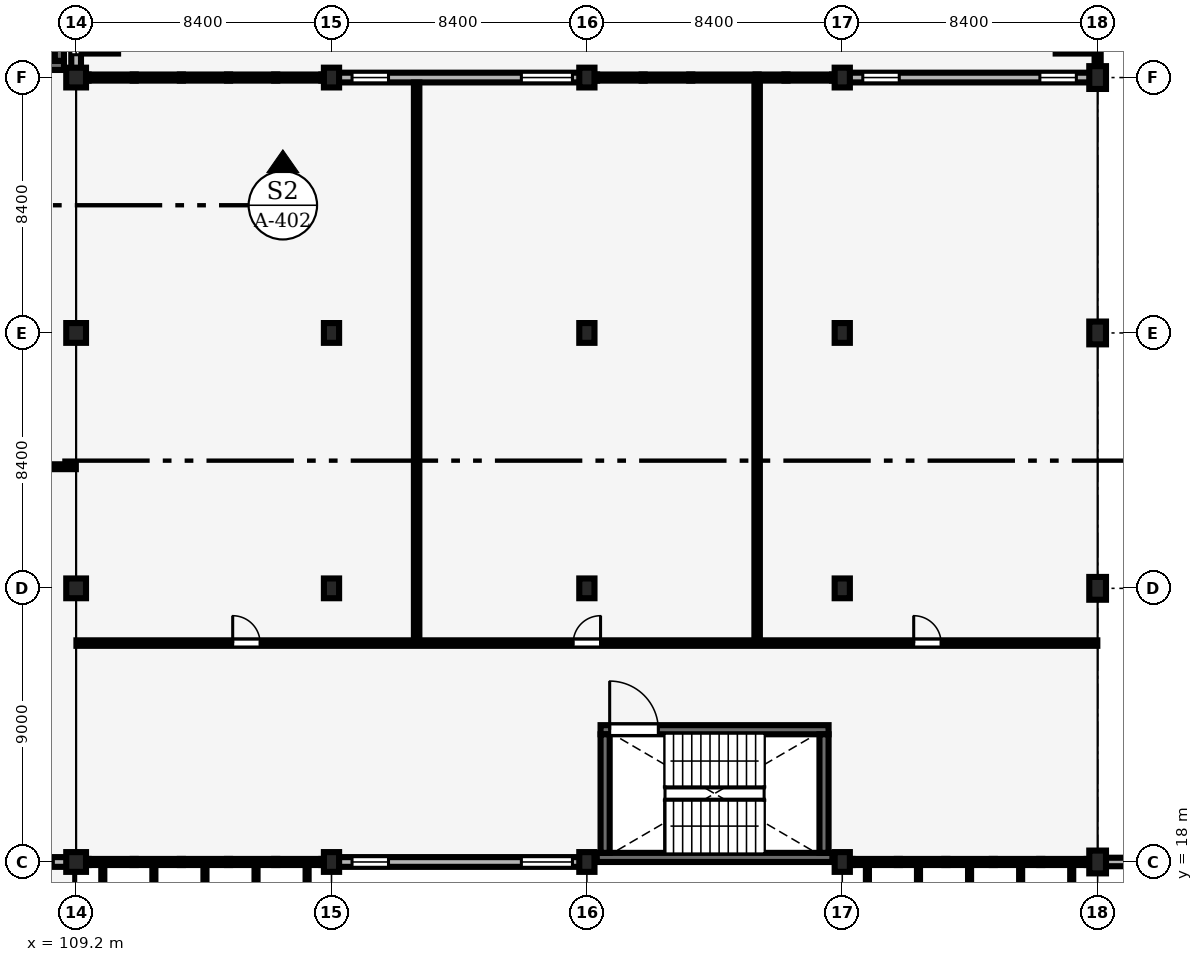
"""IFC4 building model, lengths in metres.
Left out: names, types, materials, properties, quantities, classifications, styles, units other than length and angle.
Written with IfcOpenShell. Run it as: python <this file> out.ifc"""

import sys

from ifc_helpers import new_model, si_unit, direction, frame, frame_2d, origin, origin_2d, place, context, subcontext, project, spatial, rectangle, extrude, element, fill, save


model = new_model("IFC4")
c1 = context("Model", 3, precision=1e-05, world=origin(), true_north=direction((0.0, 1.0)))
c2 = subcontext(c1, "Body", "Model", "MODEL_VIEW")
j1 = project(units=[si_unit("LENGTHUNIT", "METRE"), si_unit("PLANEANGLEUNIT", "RADIAN")], contexts=[c1])
p1 = place(None, origin())
s1 = spatial("IfcSite", under=j1, at=p1, CompositionType="ELEMENT")
p2 = place(p1, origin())
s2 = spatial("IfcBuilding", under=s1, at=p2, CompositionType="ELEMENT")
p3 = place(p2, frame((0.0, 0.0, 4.8)))
s3 = spatial("IfcBuildingStorey", under=s2, at=p3, CompositionType="ELEMENT", Elevation=4.8)
for number, where, z_axis, x_axis in (
    (1, (109.2, 18.0, 0.0), (0.0, 0.0, 1.0), (1.0, 0.0, 0.0)),
    (2, (109.2, 27.0, 0.0), (0.0, 0.0, 1.0), (1.0, 0.0, 0.0)),
    (3, (109.2, 35.4, 0.0), (0.0, 0.0, 1.0), (1.0, 0.0, 0.0)),
    (4, (109.2, 43.8, 0.0), (0.0, 0.0, 1.0), (1.0, 0.0, 0.0)),
):
    element("IfcColumn", number, at=place(p3, frame(where, z_axis=z_axis, x_axis=x_axis)), inside=s3, PredefinedType="COLUMN", context=c2, shape_type="SweptSolid", body=[
        extrude(rectangle(XDim=0.65, YDim=0.65, at=origin_2d()), origin(), (0.0, 0.0, 1.0), 4.2),
    ])
for number, where, z_axis, x_axis in (
    (5, (117.6, 18.0, 0.0), (0.0, 0.0, 1.0), (1.0, 0.0, 0.0)),
    (6, (117.6, 27.0, 0.0), (0.0, 0.0, 1.0), (1.0, 0.0, 0.0)),
    (7, (117.6, 35.4, 0.0), (0.0, 0.0, 1.0), (1.0, 0.0, 0.0)),
    (8, (117.6, 43.8, 0.0), (0.0, 0.0, 1.0), (1.0, 0.0, 0.0)),
    (9, (126.0, 18.0, 0.0), (0.0, 0.0, 1.0), (1.0, 0.0, 0.0)),
    (10, (126.0, 27.0, 0.0), (0.0, 0.0, 1.0), (1.0, 0.0, 0.0)),
    (11, (126.0, 35.4, 0.0), (0.0, 0.0, 1.0), (1.0, 0.0, 0.0)),
    (12, (126.0, 43.8, 0.0), (0.0, 0.0, 1.0), (1.0, 0.0, 0.0)),
    (13, (134.4, 18.0, 0.0), (0.0, 0.0, 1.0), (1.0, 0.0, 0.0)),
    (14, (134.4, 27.0, 0.0), (0.0, 0.0, 1.0), (1.0, 0.0, 0.0)),
    (15, (134.4, 35.4, 0.0), (0.0, 0.0, 1.0), (1.0, 0.0, 0.0)),
    (16, (134.4, 43.8, 0.0), (0.0, 0.0, 1.0), (1.0, 0.0, 0.0)),
):
    element("IfcColumn", number, at=place(p3, frame(where, z_axis=z_axis, x_axis=x_axis)), inside=s3, PredefinedType="COLUMN", context=c2, shape_type="SweptSolid", body=[
        extrude(rectangle(XDim=0.5, YDim=0.65, at=origin_2d()), origin(), (0.0, 0.0, 1.0), 4.2),
    ])
for number, where, z_axis, x_axis in (
    (17, (142.8, 18.0, 0.0), (0.0, 0.0, 1.0), (1.0, 0.0, 0.0)),
    (18, (142.8, 27.0, 0.0), (0.0, 0.0, 1.0), (1.0, 0.0, 0.0)),
    (19, (142.8, 35.4, 0.0), (0.0, 0.0, 1.0), (1.0, 0.0, 0.0)),
    (20, (142.8, 43.8, 0.0), (0.0, 0.0, 1.0), (1.0, 0.0, 0.0)),
):
    element("IfcColumn", number, at=place(p3, frame(where, z_axis=z_axis, x_axis=x_axis)), inside=s3, PredefinedType="COLUMN", context=c2, shape_type="SweptSolid", body=[
        extrude(rectangle(XDim=0.55, YDim=0.75, at=origin_2d()), origin(), (0.0, 0.0, 1.0), 4.2),
    ])
p4 = place(p3, frame((101.1, 18.0, 0.0), z_axis=(0.0, 0.0, 1.0), x_axis=(1.0, 0.0, 0.0)))
e21 = element("IfcWall", 21, at=p4, inside=s3, PredefinedType="SOLIDWALL", context=c2, shape_type="SweptSolid", body=[
    extrude(rectangle(XDim=7.8, YDim=0.32, at=frame_2d((3.9, 0.0))), origin(), (0.0, 0.0, 1.0), 3.1),
])
p5 = place(p4, frame((0.45, 0.0, 0.9)))
e22 = element("IfcOpeningElement", 22, at=p5, cuts=e21, PredefinedType="OPENING", context=c2, shape_type="SweptSolid", body=[
    extrude(rectangle(XDim=1.68, YDim=2.05, at=frame_2d((0.84, 1.025))), frame((0.0, 0.17, 0.0), z_axis=(0.0, -1.0, 0.0), x_axis=(1.0, 0.0, 0.0)), (0.0, 0.0, 1.0), 0.34),
])
p6 = place(p4, frame((6.15, 0.0, 0.9)))
e23 = element("IfcOpeningElement", 23, at=p6, cuts=e21, PredefinedType="OPENING", context=c2, shape_type="SweptSolid", body=[
    extrude(rectangle(XDim=1.2, YDim=1.5, at=frame_2d((0.6, 0.75))), frame((0.0, 0.17, 0.0), z_axis=(0.0, -1.0, 0.0), x_axis=(1.0, 0.0, 0.0)), (0.0, 0.0, 1.0), 0.34),
])
p7 = place(p3, frame((117.825, 18.0, 0.0), z_axis=(0.0, 0.0, 1.0), x_axis=(1.0, 0.0, 0.0)))
e24 = element("IfcWall", 24, at=p7, inside=s3, PredefinedType="SOLIDWALL", context=c2, shape_type="SweptSolid", body=[
    extrude(rectangle(XDim=7.95, YDim=0.32, at=frame_2d((3.975, 0.0))), origin(), (0.0, 0.0, 1.0), 3.14),
])
p8 = place(p7, frame((0.45, 0.0, 0.9)))
e25 = element("IfcOpeningElement", 25, at=p8, cuts=e24, PredefinedType="OPENING", context=c2, shape_type="SweptSolid", body=[
    extrude(rectangle(XDim=1.2, YDim=1.8, at=frame_2d((0.6, 0.9))), frame((0.0, 0.17, 0.0), z_axis=(0.0, -1.0, 0.0), x_axis=(1.0, 0.0, 0.0)), (0.0, 0.0, 1.0), 0.34),
])
p9 = place(p7, frame((6.02, 0.0, 0.9)))
e26 = element("IfcOpeningElement", 26, at=p9, cuts=e24, PredefinedType="OPENING", context=c2, shape_type="SweptSolid", body=[
    extrude(rectangle(XDim=1.68, YDim=2.09, at=frame_2d((0.84, 1.045))), frame((0.0, 0.17, 0.0), z_axis=(0.0, -1.0, 0.0), x_axis=(1.0, 0.0, 0.0)), (0.0, 0.0, 1.0), 0.34),
])
p10 = place(p3, frame((143.05, 18.0, 0.0), z_axis=(0.0, 0.0, 1.0), x_axis=(1.0, 0.0, 0.0)))
e27 = element("IfcWall", 27, at=p10, inside=s3, PredefinedType="SOLIDWALL", context=c2, shape_type="SweptSolid", body=[
    extrude(rectangle(XDim=7.9, YDim=0.28, at=frame_2d((3.95, 0.0))), origin(), (0.0, 0.0, 1.0), 3.667),
])
p11 = place(p10, frame((2.45, 0.0, 1.25)))
e28 = element("IfcOpeningElement", 28, at=p11, cuts=e27, PredefinedType="OPENING", context=c2, shape_type="SweptSolid", body=[
    extrude(rectangle(XDim=2.6, YDim=1.4, at=frame_2d((1.3, 0.7))), frame((0.0, 0.15, 0.0), z_axis=(0.0, -1.0, 0.0), x_axis=(1.0, 0.0, 0.0)), (0.0, 0.0, 1.0), 0.3),
])
p12 = place(p3, frame((117.825, 43.8, 0.0), z_axis=(0.0, 0.0, 1.0), x_axis=(1.0, 0.0, 0.0)))
e29 = element("IfcWall", 29, at=p12, inside=s3, PredefinedType="SOLIDWALL", context=c2, shape_type="SweptSolid", body=[
    extrude(rectangle(XDim=7.95, YDim=0.32, at=frame_2d((3.975, 0.0))), origin(), (0.0, 0.0, 1.0), 3.08),
])
p13 = place(p12, frame((0.45, 0.0, 0.9)))
e30 = element("IfcOpeningElement", 30, at=p13, cuts=e29, PredefinedType="OPENING", context=c2, shape_type="SweptSolid", body=[
    extrude(rectangle(XDim=1.2, YDim=1.8, at=frame_2d((0.6, 0.9))), frame((0.0, 0.17, 0.0), z_axis=(0.0, -1.0, 0.0), x_axis=(1.0, 0.0, 0.0)), (0.0, 0.0, 1.0), 0.34),
])
p14 = place(p12, frame((6.02, 0.0, 0.9)))
e31 = element("IfcOpeningElement", 31, at=p14, cuts=e29, PredefinedType="OPENING", context=c2, shape_type="SweptSolid", body=[
    extrude(rectangle(XDim=1.68, YDim=2.03, at=frame_2d((0.84, 1.015))), frame((0.0, 0.17, 0.0), z_axis=(0.0, -1.0, 0.0), x_axis=(1.0, 0.0, 0.0)), (0.0, 0.0, 1.0), 0.34),
])
p15 = place(p3, frame((134.625, 43.8, 0.0), z_axis=(0.0, 0.0, 1.0), x_axis=(1.0, 0.0, 0.0)))
e32 = element("IfcWall", 32, at=p15, inside=s3, PredefinedType="SOLIDWALL", context=c2, shape_type="SweptSolid", body=[
    extrude(rectangle(XDim=7.925, YDim=0.32, at=frame_2d((3.962, 0.0))), origin(), (0.0, 0.0, 1.0), 3.43),
])
p16 = place(p15, frame((0.45, 0.0, 0.9)))
e33 = element("IfcOpeningElement", 33, at=p16, cuts=e32, PredefinedType="OPENING", context=c2, shape_type="SweptSolid", body=[
    extrude(rectangle(XDim=1.2, YDim=1.5, at=frame_2d((0.6, 0.75))), frame((0.0, 0.17, 0.0), z_axis=(0.0, -1.0, 0.0), x_axis=(1.0, 0.0, 0.0)), (0.0, 0.0, 1.0), 0.34),
])
p17 = place(p15, frame((6.275, 0.0, 0.9)))
e34 = element("IfcOpeningElement", 34, at=p17, cuts=e32, PredefinedType="OPENING", context=c2, shape_type="SweptSolid", body=[
    extrude(rectangle(XDim=1.2, YDim=1.8, at=frame_2d((0.6, 0.9))), frame((0.0, 0.17, 0.0), z_axis=(0.0, -1.0, 0.0), x_axis=(1.0, 0.0, 0.0)), (0.0, 0.0, 1.0), 0.34),
])
p18 = place(p3, frame((109.2, 44.1, 0.0), z_axis=(0.0, 0.0, 1.0), x_axis=(0.0, 1.0, 0.0)))
e35 = element("IfcWall", 35, at=p18, inside=s3, PredefinedType="SOLIDWALL", context=c2, shape_type="SweptSolid", body=[
    extrude(rectangle(XDim=7.8, YDim=0.32, at=frame_2d((3.9, 0.0))), origin(), (0.0, 0.0, 1.0), 3.3),
])
p19 = place(p18, frame((0.45, 0.0, 0.85)))
e36 = element("IfcOpeningElement", 36, at=p19, cuts=e35, PredefinedType="OPENING", context=c2, shape_type="SweptSolid", body=[
    extrude(rectangle(XDim=1.2, YDim=1.8, at=frame_2d((0.6, 0.9))), frame((0.0, 0.17, 0.0), z_axis=(0.0, -1.0, 0.0), x_axis=(1.0, 0.0, 0.0)), (0.0, 0.0, 1.0), 0.34),
])
p20 = place(p18, frame((6.15, 0.0, 0.85)))
e37 = element("IfcOpeningElement", 37, at=p20, cuts=e35, PredefinedType="OPENING", context=c2, shape_type="SweptSolid", body=[
    extrude(rectangle(XDim=1.2, YDim=1.8, at=frame_2d((0.6, 0.9))), frame((0.0, 0.17, 0.0), z_axis=(0.0, -1.0, 0.0), x_axis=(1.0, 0.0, 0.0)), (0.0, 0.0, 1.0), 0.34),
])
p21 = place(p3, frame((101.2, 44.2, 0.0), z_axis=(0.0, 0.0, 1.0), x_axis=(1.0, 0.0, 0.0)))
e38 = element("IfcWall", 38, at=p21, inside=s3, PredefinedType="SHEAR", context=c2, shape_type="SweptSolid", body=[
    extrude(rectangle(XDim=7.6, YDim=0.3, at=frame_2d((3.8, 0.0))), origin(), (0.0, 0.0, 1.0), 4.025),
])
p22 = place(p3, frame((108.65, 44.35, 0.0), z_axis=(0.0, 0.0, 1.0), x_axis=(0.0, 1.0, 0.0)))
e39 = element("IfcWall", 39, at=p22, inside=s3, PredefinedType="SHEAR", context=c2, shape_type="SweptSolid", body=[
    extrude(rectangle(XDim=3.8, YDim=0.3, at=frame_2d((1.9, 0.0))), origin(), (0.0, 0.0, 1.0), 4.025),
])
p23 = place(p3, frame((126.325, 18.15, 0.0), z_axis=(0.0, 0.0, 1.0), x_axis=(1.0, 0.0, 0.0)))
e40 = element("IfcWall", 40, at=p23, inside=s3, PredefinedType="SHEAR", context=c2, shape_type="SweptSolid", body=[
    extrude(rectangle(XDim=7.75, YDim=0.3, at=frame_2d((3.875, 0.0))), origin(), (0.0, 0.0, 1.0), 4.025),
])
p24 = place(p3, frame((126.45, 22.35, 0.0), z_axis=(0.0, 0.0, 1.0), x_axis=(1.0, 0.0, 0.0)))
e41 = element("IfcWall", 41, at=p24, inside=s3, PredefinedType="SHEAR", context=c2, shape_type="SweptSolid", body=[
    extrude(rectangle(XDim=7.5, YDim=0.3, at=frame_2d((3.75, 0.0))), origin(), (0.0, 0.0, 1.0), 4.025),
])
p25 = place(p24, frame((0.3, 0.0, 0.0)))
e42 = element("IfcOpeningElement", 42, at=p25, cuts=e41, PredefinedType="OPENING", context=c2, shape_type="SweptSolid", body=[
    extrude(rectangle(XDim=1.6, YDim=2.2, at=frame_2d((0.8, 1.1))), frame((0.0, 0.16, 0.0), z_axis=(0.0, -1.0, 0.0), x_axis=(1.0, 0.0, 0.0)), (0.0, 0.0, 1.0), 0.32),
])
for number, where, z_axis, x_axis in (
    (43, (126.6, 18.3, 0.0), (0.0, 0.0, 1.0), (0.0, 1.0, 0.0)),
    (44, (133.8, 18.3, 0.0), (0.0, 0.0, 1.0), (0.0, 1.0, 0.0)),
):
    element("IfcWall", number, at=place(p3, frame(where, z_axis=z_axis, x_axis=x_axis)), inside=s3, PredefinedType="SHEAR", context=c2, shape_type="SweptSolid", body=[
        extrude(rectangle(XDim=3.9, YDim=0.3, at=frame_2d((1.95, 0.0))), origin(), (0.0, 0.0, 1.0), 4.025),
    ])
p26 = place(p3, frame((101.105, 31.0, 0.0), z_axis=(0.0, 0.0, 1.0), x_axis=(1.0, 0.0, 0.0)))
e45 = element("IfcWall", 45, at=p26, inside=s3, PredefinedType="PARTITIONING", context=c2, shape_type="SweptSolid", body=[
    extrude(rectangle(XDim=8.085, YDim=0.16, at=frame_2d((4.042, 0.0))), origin(), (0.0, 0.0, 1.0), 3.9),
])
p27 = place(p3, frame((120.4, 25.295, 0.0), z_axis=(0.0, 0.0, 1.0), x_axis=(0.0, 1.0, 0.0)))
e46 = element("IfcWall", 46, at=p27, inside=s3, PredefinedType="PARTITIONING", context=c2, shape_type="SweptSolid", body=[
    extrude(rectangle(XDim=18.34, YDim=0.18, at=frame_2d((9.17, 0.0))), origin(), (0.0, 0.0, 1.0), 3.9),
])
p28 = place(p3, frame((131.6, 25.295, 0.0), z_axis=(0.0, 0.0, 1.0), x_axis=(0.0, 1.0, 0.0)))
e47 = element("IfcWall", 47, at=p28, inside=s3, PredefinedType="PARTITIONING", context=c2, shape_type="SweptSolid", body=[
    extrude(rectangle(XDim=18.4, YDim=0.18, at=frame_2d((9.2, 0.0))), origin(), (0.0, 0.0, 1.0), 3.9),
])
p29 = place(p3, frame((109.21, 25.2, 0.0), z_axis=(0.0, 0.0, 1.0), x_axis=(1.0, 0.0, 0.0)))
e48 = element("IfcWall", 48, at=p29, inside=s3, PredefinedType="PARTITIONING", context=c2, shape_type="SweptSolid", body=[
    extrude(rectangle(XDim=33.58, YDim=0.18, at=frame_2d((16.79, 0.0))), origin(), (0.0, 0.0, 1.0), 3.9),
])
p30 = place(p29, frame((5.14, 0.0, 0.0)))
e49 = element("IfcOpeningElement", 49, at=p30, cuts=e48, PredefinedType="OPENING", context=c2, shape_type="SweptSolid", body=[
    extrude(rectangle(XDim=0.9, YDim=2.1, at=frame_2d((0.45, 1.05))), frame((0.0, 0.1, 0.0), z_axis=(0.0, -1.0, 0.0), x_axis=(1.0, 0.0, 0.0)), (0.0, 0.0, 1.0), 0.2),
])
p31 = place(p29, frame((16.34, 0.0, 0.0)))
e50 = element("IfcOpeningElement", 50, at=p31, cuts=e48, PredefinedType="OPENING", context=c2, shape_type="SweptSolid", body=[
    extrude(rectangle(XDim=0.9, YDim=2.1, at=frame_2d((0.45, 1.05))), frame((0.0, 0.1, 0.0), z_axis=(0.0, -1.0, 0.0), x_axis=(1.0, 0.0, 0.0)), (0.0, 0.0, 1.0), 0.2),
])
p32 = place(p29, frame((27.54, 0.0, 0.0)))
e51 = element("IfcOpeningElement", 51, at=p32, cuts=e48, PredefinedType="OPENING", context=c2, shape_type="SweptSolid", body=[
    extrude(rectangle(XDim=0.9, YDim=2.1, at=frame_2d((0.45, 1.05))), frame((0.0, 0.1, 0.0), z_axis=(0.0, -1.0, 0.0), x_axis=(1.0, 0.0, 0.0)), (0.0, 0.0, 1.0), 0.2),
])
p33 = place(p6, origin())
e52 = element("IfcWindow", 52, at=p33, inside=s3, PartitioningType="SINGLE_PANEL", PredefinedType="WINDOW", context=c2, shape_type="SweptSolid", body=[
    extrude(rectangle(XDim=1.2, YDim=1.5, at=frame_2d((0.6, 0.75))), frame((0.0, 0.03, 0.0), z_axis=(0.0, -1.0, 0.0), x_axis=(1.0, 0.0, 0.0)), (0.0, 0.0, 1.0), 0.06),
])
fill(e23, e52)
p34 = place(p8, origin())
e53 = element("IfcWindow", 53, at=p34, inside=s3, PartitioningType="SINGLE_PANEL", PredefinedType="WINDOW", context=c2, shape_type="SweptSolid", body=[
    extrude(rectangle(XDim=1.2, YDim=1.8, at=frame_2d((0.6, 0.9))), frame((0.0, 0.03, 0.0), z_axis=(0.0, -1.0, 0.0), x_axis=(1.0, 0.0, 0.0)), (0.0, 0.0, 1.0), 0.06),
])
fill(e25, e53)
p35 = place(p9, origin())
e54 = element("IfcWindow", 54, at=p35, inside=s3, PartitioningType="SINGLE_PANEL", PredefinedType="WINDOW", context=c2, shape_type="SweptSolid", body=[
    extrude(rectangle(XDim=1.68, YDim=2.09, at=frame_2d((0.84, 1.045))), frame((0.0, 0.03, 0.0), z_axis=(0.0, -1.0, 0.0), x_axis=(1.0, 0.0, 0.0)), (0.0, 0.0, 1.0), 0.06),
])
fill(e26, e54)
p36 = place(p13, origin())
e55 = element("IfcWindow", 55, at=p36, inside=s3, PartitioningType="SINGLE_PANEL", PredefinedType="WINDOW", context=c2, shape_type="SweptSolid", body=[
    extrude(rectangle(XDim=1.2, YDim=1.8, at=frame_2d((0.6, 0.9))), frame((0.0, 0.03, 0.0), z_axis=(0.0, -1.0, 0.0), x_axis=(1.0, 0.0, 0.0)), (0.0, 0.0, 1.0), 0.06),
])
fill(e30, e55)
p37 = place(p14, origin())
e56 = element("IfcWindow", 56, at=p37, inside=s3, PartitioningType="SINGLE_PANEL", PredefinedType="WINDOW", context=c2, shape_type="SweptSolid", body=[
    extrude(rectangle(XDim=1.68, YDim=2.03, at=frame_2d((0.84, 1.015))), frame((0.0, 0.03, 0.0), z_axis=(0.0, -1.0, 0.0), x_axis=(1.0, 0.0, 0.0)), (0.0, 0.0, 1.0), 0.06),
])
fill(e31, e56)
p38 = place(p16, origin())
e57 = element("IfcWindow", 57, at=p38, inside=s3, PartitioningType="SINGLE_PANEL", PredefinedType="WINDOW", context=c2, shape_type="SweptSolid", body=[
    extrude(rectangle(XDim=1.2, YDim=1.5, at=frame_2d((0.6, 0.75))), frame((0.0, 0.03, 0.0), z_axis=(0.0, -1.0, 0.0), x_axis=(1.0, 0.0, 0.0)), (0.0, 0.0, 1.0), 0.06),
])
fill(e33, e57)
p39 = place(p17, origin())
e58 = element("IfcWindow", 58, at=p39, inside=s3, PartitioningType="SINGLE_PANEL", PredefinedType="WINDOW", context=c2, shape_type="SweptSolid", body=[
    extrude(rectangle(XDim=1.2, YDim=1.8, at=frame_2d((0.6, 0.9))), frame((0.0, 0.03, 0.0), z_axis=(0.0, -1.0, 0.0), x_axis=(1.0, 0.0, 0.0)), (0.0, 0.0, 1.0), 0.06),
])
fill(e34, e58)
p40 = place(p19, origin())
e59 = element("IfcWindow", 59, at=p40, inside=s3, PartitioningType="SINGLE_PANEL", PredefinedType="WINDOW", context=c2, shape_type="SweptSolid", body=[
    extrude(rectangle(XDim=1.2, YDim=1.8, at=frame_2d((0.6, 0.9))), frame((0.0, 0.03, 0.0), z_axis=(0.0, -1.0, 0.0), x_axis=(1.0, 0.0, 0.0)), (0.0, 0.0, 1.0), 0.06),
])
fill(e36, e59)
p41 = place(p25, origin())
e60 = element("IfcDoor", 60, at=p41, inside=s3, OperationType="DOUBLE_DOOR_SINGLE_SWING", PredefinedType="DOOR", context=c2, shape_type="SweptSolid", body=[
    extrude(rectangle(XDim=1.6, YDim=2.2, at=frame_2d((0.8, 1.1))), frame((0.0, 0.025, 0.0), z_axis=(0.0, -1.0, 0.0), x_axis=(1.0, 0.0, 0.0)), (0.0, 0.0, 1.0), 0.05),
])
fill(e42, e60)
p42 = place(p30, origin())
e61 = element("IfcDoor", 61, at=p42, inside=s3, OperationType="SINGLE_SWING_LEFT", PredefinedType="DOOR", context=c2, shape_type="SweptSolid", body=[
    extrude(rectangle(XDim=0.9, YDim=2.1, at=frame_2d((0.45, 1.05))), frame((0.0, 0.025, 0.0), z_axis=(0.0, -1.0, 0.0), x_axis=(1.0, 0.0, 0.0)), (0.0, 0.0, 1.0), 0.05),
])
fill(e49, e61)
p43 = place(p31, origin())
e62 = element("IfcDoor", 62, at=p43, inside=s3, OperationType="SINGLE_SWING_RIGHT", PredefinedType="DOOR", context=c2, shape_type="SweptSolid", body=[
    extrude(rectangle(XDim=0.9, YDim=2.1, at=frame_2d((0.45, 1.05))), frame((0.0, 0.025, 0.0), z_axis=(0.0, -1.0, 0.0), x_axis=(1.0, 0.0, 0.0)), (0.0, 0.0, 1.0), 0.05),
])
fill(e50, e62)
p44 = place(p32, origin())
e63 = element("IfcDoor", 63, at=p44, inside=s3, OperationType="SINGLE_SWING_LEFT", PredefinedType="DOOR", context=c2, shape_type="SweptSolid", body=[
    extrude(rectangle(XDim=0.9, YDim=2.1, at=frame_2d((0.45, 1.05))), frame((0.0, 0.025, 0.0), z_axis=(0.0, -1.0, 0.0), x_axis=(1.0, 0.0, 0.0)), (0.0, 0.0, 1.0), 0.05),
])
fill(e51, e63)
save(model, sys.argv[1])
